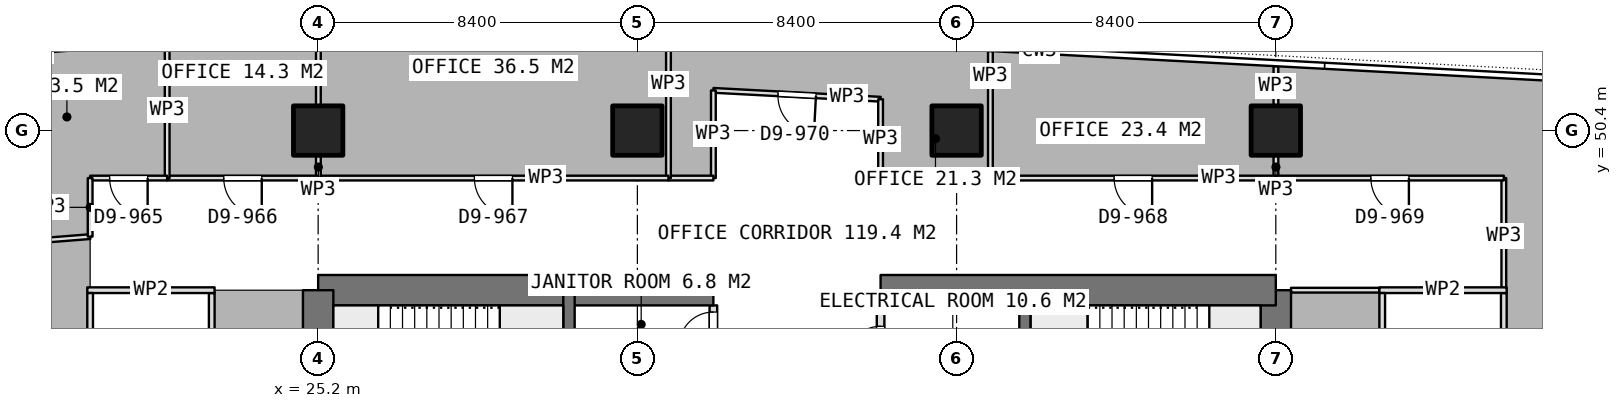
"""IFC4 building model, lengths in metres.
Left out: names, types, materials, properties, quantities, classifications, styles, units other than length and angle.
Written with IfcOpenShell. Run it as: python <this file> out.ifc"""

import sys

from ifc_helpers import new_model, si_unit, direction, frame, frame_2d, origin, origin_2d, place, context, subcontext, project, spatial, rectangle, extrude, element, fill, save


model = new_model("IFC4")
c1 = context("Model", 3, precision=1e-05, world=origin(), true_north=direction((0.0, 1.0)))
c2 = subcontext(c1, "Body", "Model", "MODEL_VIEW")
j1 = project(units=[si_unit("LENGTHUNIT", "METRE"), si_unit("PLANEANGLEUNIT", "RADIAN")], contexts=[c1])
p1 = place(None, origin())
s1 = spatial("IfcSite", under=j1, at=p1, CompositionType="ELEMENT")
p2 = place(p1, origin())
s2 = spatial("IfcBuilding", under=s1, at=p2, CompositionType="ELEMENT")
p3 = place(p2, frame((0.0, 0.0, 257.6)))
s3 = spatial("IfcBuildingStorey", under=s2, at=p3, CompositionType="ELEMENT", Elevation=257.6)
p4 = place(p3, frame((25.2, 46.2, 0.0), z_axis=(0.0, 0.0, 1.0), x_axis=(1.0, 0.0, 0.0)))
e1 = element("IfcWall", 1, at=p4, inside=s3, PredefinedType="SHEAR", context=c2, shape_type="SweptSolid", body=[
    extrude(rectangle(XDim=10.4, YDim=0.8, at=frame_2d((5.2, 0.0))), origin(), (0.0, 0.0, 1.0), 3.75),
])
p5 = place(p3, frame((40.0, 46.2, 0.0), z_axis=(0.0, 0.0, 1.0), x_axis=(1.0, 0.0, 0.0)))
e2 = element("IfcWall", 2, at=p5, inside=s3, PredefinedType="SHEAR", context=c2, shape_type="SweptSolid", body=[
    extrude(rectangle(XDim=10.4, YDim=0.8, at=frame_2d((5.2, 0.0))), origin(), (0.0, 0.0, 1.0), 3.75),
])
p6 = place(p3, frame((25.2, 21.0, 0.0), z_axis=(0.0, 0.0, 1.0), x_axis=(0.0, 1.0, 0.0)))
e3 = element("IfcWall", 3, at=p6, inside=s3, PredefinedType="SHEAR", context=c2, shape_type="SweptSolid", body=[
    extrude(rectangle(XDim=25.2, YDim=0.8, at=frame_2d((12.6, 0.0))), origin(), (0.0, 0.0, 1.0), 3.75),
])
p7 = place(p6, frame((7.8, 0.0, 0.0)))
e4 = element("IfcOpeningElement", 4, at=p7, cuts=e3, PredefinedType="OPENING", context=c2, shape_type="SweptSolid", body=[
    extrude(rectangle(XDim=1.2, YDim=2.1, at=frame_2d((0.6, 1.05))), frame((0.0, 0.41, 0.0), z_axis=(0.0, -1.0, 0.0), x_axis=(1.0, 0.0, 0.0)), (0.0, 0.0, 1.0), 0.82),
])
p8 = place(p6, frame((14.25, 0.0, 0.0)))
e5 = element("IfcOpeningElement", 5, at=p8, cuts=e3, PredefinedType="OPENING", context=c2, shape_type="SweptSolid", body=[
    extrude(rectangle(XDim=0.9, YDim=2.1, at=frame_2d((0.45, 1.05))), frame((0.0, 0.41, 0.0), z_axis=(0.0, -1.0, 0.0), x_axis=(1.0, 0.0, 0.0)), (0.0, 0.0, 1.0), 0.82),
])
p9 = place(p6, frame((16.85, 0.0, 0.0)))
e6 = element("IfcOpeningElement", 6, at=p9, cuts=e3, PredefinedType="OPENING", context=c2, shape_type="SweptSolid", body=[
    extrude(rectangle(XDim=0.9, YDim=2.1, at=frame_2d((0.45, 1.05))), frame((0.0, 0.41, 0.0), z_axis=(0.0, -1.0, 0.0), x_axis=(1.0, 0.0, 0.0)), (0.0, 0.0, 1.0), 0.82),
])
p10 = place(p6, frame((18.95, 0.0, 0.0)))
e7 = element("IfcOpeningElement", 7, at=p10, cuts=e3, PredefinedType="OPENING", context=c2, shape_type="SweptSolid", body=[
    extrude(rectangle(XDim=1.2, YDim=2.1, at=frame_2d((0.6, 1.05))), frame((0.0, 0.41, 0.0), z_axis=(0.0, -1.0, 0.0), x_axis=(1.0, 0.0, 0.0)), (0.0, 0.0, 1.0), 0.82),
])
p11 = place(p3, frame((50.4, 21.0, 0.0), z_axis=(0.0, 0.0, 1.0), x_axis=(0.0, 1.0, 0.0)))
e8 = element("IfcWall", 8, at=p11, inside=s3, PredefinedType="SHEAR", context=c2, shape_type="SweptSolid", body=[
    extrude(rectangle(XDim=25.2, YDim=0.8, at=frame_2d((12.6, 0.0))), origin(), (0.0, 0.0, 1.0), 3.75),
])
p12 = place(p11, frame((16.2, 0.0, 0.0)))
e9 = element("IfcOpeningElement", 9, at=p12, cuts=e8, PredefinedType="OPENING", context=c2, shape_type="SweptSolid", body=[
    extrude(rectangle(XDim=1.2, YDim=2.1, at=frame_2d((0.6, 1.05))), frame((0.0, 0.41, 0.0), z_axis=(0.0, -1.0, 0.0), x_axis=(1.0, 0.0, 0.0)), (0.0, 0.0, 1.0), 0.82),
])
p13 = place(p11, frame((10.05, 0.0, 0.0)))
e10 = element("IfcOpeningElement", 10, at=p13, cuts=e8, PredefinedType="OPENING", context=c2, shape_type="SweptSolid", body=[
    extrude(rectangle(XDim=0.9, YDim=2.1, at=frame_2d((0.45, 1.05))), frame((0.0, 0.41, 0.0), z_axis=(0.0, -1.0, 0.0), x_axis=(1.0, 0.0, 0.0)), (0.0, 0.0, 1.0), 0.82),
])
p14 = place(p11, frame((7.45, 0.0, 0.0)))
e11 = element("IfcOpeningElement", 11, at=p14, cuts=e8, PredefinedType="OPENING", context=c2, shape_type="SweptSolid", body=[
    extrude(rectangle(XDim=0.9, YDim=2.1, at=frame_2d((0.45, 1.05))), frame((0.0, 0.41, 0.0), z_axis=(0.0, -1.0, 0.0), x_axis=(1.0, 0.0, 0.0)), (0.0, 0.0, 1.0), 0.82),
])
p15 = place(p11, frame((0.6, 0.0, 0.0)))
e12 = element("IfcOpeningElement", 12, at=p15, cuts=e8, PredefinedType="OPENING", context=c2, shape_type="SweptSolid", body=[
    extrude(rectangle(XDim=1.2, YDim=2.1, at=frame_2d((0.6, 1.05))), frame((0.0, 0.41, 0.0), z_axis=(0.0, -1.0, 0.0), x_axis=(1.0, 0.0, 0.0)), (0.0, 0.0, 1.0), 0.82),
])
for number, where, z_axis, x_axis in (
    (13, (31.8, 21.0, 0.0), (0.0, 0.0, 1.0), (0.0, 1.0, 0.0)),
    (14, (43.8, 21.0, 0.0), (0.0, 0.0, 1.0), (0.0, 1.0, 0.0)),
):
    element("IfcWall", number, at=place(p3, frame(where, z_axis=z_axis, x_axis=x_axis)), inside=s3, PredefinedType="SHEAR", context=c2, shape_type="SweptSolid", body=[
        extrude(rectangle(XDim=25.2, YDim=0.3, at=frame_2d((12.6, 0.0))), origin(), (0.0, 0.0, 1.0), 3.75),
    ])
for number, where, z_axis, x_axis in (
    (15, (25.2, 50.4, 0.0), (0.0, 0.0, 1.0), (1.0, 0.0, 0.0)),
    (16, (33.6, 50.4, 0.0), (0.0, 0.0, 1.0), (1.0, 0.0, 0.0)),
    (17, (42.0, 50.4, 0.0), (0.0, 0.0, 1.0), (1.0, 0.0, 0.0)),
    (18, (50.4, 50.4, 0.0), (0.0, 0.0, 1.0), (1.0, 0.0, 0.0)),
):
    element("IfcColumn", number, at=place(p3, frame(where, z_axis=z_axis, x_axis=x_axis)), inside=s3, PredefinedType="COLUMN", context=c2, shape_type="SweptSolid", body=[
        extrude(rectangle(XDim=1.3, YDim=1.3, at=origin_2d()), origin(), (0.0, 0.0, 1.0), 3.75),
    ])
p16 = place(p3, frame((40.0, 41.55, 0.0), z_axis=(0.0, 0.0, 1.0), x_axis=(0.0, 1.0, 0.0)))
e19 = element("IfcWall", 19, at=p16, inside=s3, PredefinedType="PARTITIONING", context=c2, shape_type="SweptSolid", body=[
    extrude(rectangle(XDim=4.25, YDim=0.2, at=frame_2d((2.125, 0.0))), origin(), (0.0, 0.0, 1.0), 3.5),
])
p17 = place(p16, frame((2.8, 0.0, 0.0)))
e20 = element("IfcOpeningElement", 20, at=p17, cuts=e19, PredefinedType="OPENING", context=c2, shape_type="SweptSolid", body=[
    extrude(rectangle(XDim=0.9, YDim=2.1, at=frame_2d((0.45, 1.05))), frame((0.0, 0.11, 0.0), z_axis=(0.0, -1.0, 0.0), x_axis=(1.0, 0.0, 0.0)), (0.0, 0.0, 1.0), 0.22),
])
p18 = place(p16, frame((0.4, 0.0, 0.0)))
e21 = element("IfcOpeningElement", 21, at=p18, cuts=e19, PredefinedType="OPENING", context=c2, shape_type="SweptSolid", body=[
    extrude(rectangle(XDim=0.9, YDim=2.1, at=frame_2d((0.45, 1.05))), frame((0.0, 0.11, 0.0), z_axis=(0.0, -1.0, 0.0), x_axis=(1.0, 0.0, 0.0)), (0.0, 0.0, 1.0), 0.22),
])
p19 = place(p3, frame((35.6, 41.55, 0.0), z_axis=(0.0, 0.0, 1.0), x_axis=(0.0, 1.0, 0.0)))
e22 = element("IfcWall", 22, at=p19, inside=s3, PredefinedType="PARTITIONING", context=c2, shape_type="SweptSolid", body=[
    extrude(rectangle(XDim=4.25, YDim=0.2, at=frame_2d((2.125, 0.0))), origin(), (0.0, 0.0, 1.0), 3.5),
])
p20 = place(p19, frame((3.175, 0.0, 0.0)))
e23 = element("IfcOpeningElement", 23, at=p20, cuts=e22, PredefinedType="OPENING", context=c2, shape_type="SweptSolid", body=[
    extrude(rectangle(XDim=0.9, YDim=2.1, at=frame_2d((0.45, 1.05))), frame((0.0, 0.11, 0.0), z_axis=(0.0, -1.0, 0.0), x_axis=(1.0, 0.0, 0.0)), (0.0, 0.0, 1.0), 0.22),
])
p21 = place(p19, frame((0.8, 0.0, 0.0)))
e24 = element("IfcOpeningElement", 24, at=p21, cuts=e22, PredefinedType="OPENING", context=c2, shape_type="SweptSolid", body=[
    extrude(rectangle(XDim=1.1, YDim=2.1, at=frame_2d((0.55, 1.05))), frame((0.0, 0.11, 0.0), z_axis=(0.0, -1.0, 0.0), x_axis=(1.0, 0.0, 0.0)), (0.0, 0.0, 1.0), 0.22),
])
p22 = place(p3, frame((53.125, 46.2, 0.0), z_axis=(0.0, 0.0, 1.0), x_axis=(1.0, 0.0, 0.0)))
e25 = element("IfcWall", 25, at=p22, inside=s3, PredefinedType="PARTITIONING", context=c2, shape_type="SweptSolid", body=[
    extrude(rectangle(XDim=3.35, YDim=0.15, at=frame_2d((1.675, 0.0))), origin(), (0.0, 0.0, 1.0), 3.5),
])
p23 = place(p3, frame((53.2, 39.275, 0.0), z_axis=(0.0, 0.0, 1.0), x_axis=(0.0, 1.0, 0.0)))
e26 = element("IfcWall", 26, at=p23, inside=s3, PredefinedType="PARTITIONING", context=c2, shape_type="SweptSolid", body=[
    extrude(rectangle(XDim=6.85, YDim=0.15, at=frame_2d((3.425, 0.0))), origin(), (0.0, 0.0, 1.0), 3.5),
])
p24 = place(p23, frame((2.925, 0.0, 0.0)))
e27 = element("IfcOpeningElement", 27, at=p24, cuts=e26, PredefinedType="OPENING", context=c2, shape_type="SweptSolid", body=[
    extrude(rectangle(XDim=1.0, YDim=2.1, at=frame_2d((0.5, 1.05))), frame((0.0, 0.085, 0.0), z_axis=(0.0, -1.0, 0.0), x_axis=(1.0, 0.0, 0.0)), (0.0, 0.0, 1.0), 0.17),
])
p25 = place(p3, frame((56.4, 39.275, 0.0), z_axis=(0.0, 0.0, 1.0), x_axis=(0.0, 1.0, 0.0)))
e28 = element("IfcWall", 28, at=p25, inside=s3, PredefinedType="PARTITIONING", context=c2, shape_type="SweptSolid", body=[
    extrude(rectangle(XDim=6.85, YDim=0.15, at=frame_2d((3.425, 0.0))), origin(), (0.0, 0.0, 1.0), 3.5),
])
p26 = place(p3, frame((19.125, 46.2, 0.0), z_axis=(0.0, 0.0, 1.0), x_axis=(1.0, 0.0, 0.0)))
e29 = element("IfcWall", 29, at=p26, inside=s3, PredefinedType="PARTITIONING", context=c2, shape_type="SweptSolid", body=[
    extrude(rectangle(XDim=3.35, YDim=0.15, at=frame_2d((1.675, 0.0))), origin(), (0.0, 0.0, 1.0), 3.5),
])
p27 = place(p3, frame((19.2, 39.275, 0.0), z_axis=(0.0, 0.0, 1.0), x_axis=(0.0, 1.0, 0.0)))
e30 = element("IfcWall", 30, at=p27, inside=s3, PredefinedType="PARTITIONING", context=c2, shape_type="SweptSolid", body=[
    extrude(rectangle(XDim=6.85, YDim=0.15, at=frame_2d((3.425, 0.0))), origin(), (0.0, 0.0, 1.0), 3.5),
])
p28 = place(p3, frame((22.4, 39.275, 0.0), z_axis=(0.0, 0.0, 1.0), x_axis=(0.0, 1.0, 0.0)))
e31 = element("IfcWall", 31, at=p28, inside=s3, PredefinedType="PARTITIONING", context=c2, shape_type="SweptSolid", body=[
    extrude(rectangle(XDim=6.85, YDim=0.15, at=frame_2d((3.425, 0.0))), origin(), (0.0, 0.0, 1.0), 3.5),
])
p29 = place(p28, frame((2.925, 0.0, 0.0)))
e32 = element("IfcOpeningElement", 32, at=p29, cuts=e31, PredefinedType="OPENING", context=c2, shape_type="SweptSolid", body=[
    extrude(rectangle(XDim=1.0, YDim=2.1, at=frame_2d((0.5, 1.05))), frame((0.0, 0.085, 0.0), z_axis=(0.0, -1.0, 0.0), x_axis=(1.0, 0.0, 0.0)), (0.0, 0.0, 1.0), 0.17),
])
p30 = place(p3, frame((50.8, 46.2, 0.0), z_axis=(0.0, 0.0, 1.0), x_axis=(1.0, 0.0, 0.0)))
e33 = element("IfcWall", 33, at=p30, inside=s3, PredefinedType="PARTITIONING", context=c2, shape_type="SweptSolid", body=[
    extrude(rectangle(XDim=2.324, YDim=0.125, at=frame_2d((1.162, 0.0))), origin(), (0.0, 0.0, 1.0), 3.5),
])
p31 = place(p3, frame((50.403, 49.15, 0.0), z_axis=(0.0, 0.0, 1.0), x_axis=(0.0, 1.0, 0.0)))
e34 = element("IfcWall", 34, at=p31, inside=s3, PredefinedType="PARTITIONING", context=c2, shape_type="SweptSolid", body=[
    extrude(rectangle(XDim=0.58, YDim=0.125, at=frame_2d((0.29, 0.0))), origin(), (0.0, 0.0, 1.0), 3.5),
])
p32 = place(p3, frame((50.403, 51.07, 0.0), z_axis=(0.0, 0.0, 1.0), x_axis=(0.0, 1.0, 0.0)))
e35 = element("IfcWall", 35, at=p32, inside=s3, PredefinedType="PARTITIONING", context=c2, shape_type="SweptSolid", body=[
    extrude(rectangle(XDim=1.024, YDim=0.125, at=frame_2d((0.512, 0.0))), origin(), (0.0, 0.0, 1.0), 3.5),
])
p33 = place(p3, frame((56.4, 46.125, 0.0), z_axis=(0.0, 0.0, 1.0), x_axis=(0.0, 1.0, 0.0)))
e36 = element("IfcWall", 36, at=p33, inside=s3, PredefinedType="PARTITIONING", context=c2, shape_type="SweptSolid", body=[
    extrude(rectangle(XDim=3.025, YDim=0.125, at=frame_2d((1.512, 0.0))), origin(), (0.0, 0.0, 1.0), 3.5),
])
p34 = place(p3, frame((56.4, 49.15, 0.0), z_axis=(0.0, 0.0, 1.0), x_axis=(-1.0, 0.0, 0.0)))
e37 = element("IfcWall", 37, at=p34, inside=s3, PredefinedType="PARTITIONING", context=c2, shape_type="SweptSolid", body=[
    extrude(rectangle(XDim=5.997, YDim=0.125, at=frame_2d((2.999, 0.0))), origin(), (0.0, 0.0, 1.0), 3.5),
])
p35 = place(p34, frame((2.498, 0.0, 0.0)))
e38 = element("IfcOpeningElement", 38, at=p35, cuts=e37, PredefinedType="OPENING", context=c2, shape_type="SweptSolid", body=[
    extrude(rectangle(XDim=1.0, YDim=2.1, at=frame_2d((0.5, 1.05))), frame((0.0, 0.073, 0.0), z_axis=(0.0, -1.0, 0.0), x_axis=(1.0, 0.0, 0.0)), (0.0, 0.0, 1.0), 0.145),
])
p36 = place(p3, frame((50.402, 49.15, 0.0), z_axis=(0.0, 0.0, 1.0), x_axis=(-1.0, 0.0, 0.0)))
e39 = element("IfcWall", 39, at=p36, inside=s3, PredefinedType="PARTITIONING", context=c2, shape_type="SweptSolid", body=[
    extrude(rectangle(XDim=7.512, YDim=0.125, at=frame_2d((3.756, 0.0))), origin(), (0.0, 0.0, 1.0), 3.5),
])
p37 = place(p36, frame((3.256, 0.0, 0.0)))
e40 = element("IfcOpeningElement", 40, at=p37, cuts=e39, PredefinedType="OPENING", context=c2, shape_type="SweptSolid", body=[
    extrude(rectangle(XDim=1.0, YDim=2.1, at=frame_2d((0.5, 1.05))), frame((0.0, 0.073, 0.0), z_axis=(0.0, -1.0, 0.0), x_axis=(1.0, 0.0, 0.0)), (0.0, 0.0, 1.0), 0.145),
])
p38 = place(p3, frame((42.89, 49.15, 0.0), z_axis=(0.0, 0.0, 1.0), x_axis=(0.0, 1.0, 0.0)))
e41 = element("IfcWall", 41, at=p38, inside=s3, PredefinedType="PARTITIONING", context=c2, shape_type="SweptSolid", body=[
    extrude(rectangle(XDim=3.343, YDim=0.125, at=frame_2d((1.671, 0.0))), origin(), (0.0, 0.0, 1.0), 3.5),
])
p39 = place(p3, frame((40.0, 51.225, 0.0), z_axis=(0.0, 0.0, 1.0), x_axis=(-0.998601864588, 0.052861290579, 0.0)))
e42 = element("IfcWall", 42, at=p39, inside=s3, PredefinedType="PARTITIONING", context=c2, shape_type="SweptSolid", body=[
    extrude(rectangle(XDim=4.406, YDim=0.125, at=frame_2d((2.203, 0.0))), origin(), (0.0, 0.0, 1.0), 3.5),
])
p40 = place(p39, frame((1.703, 0.0, 0.0)))
e43 = element("IfcOpeningElement", 43, at=p40, cuts=e42, PredefinedType="OPENING", context=c2, shape_type="SweptSolid", body=[
    extrude(rectangle(XDim=1.0, YDim=2.1, at=frame_2d((0.5, 1.05))), frame((0.0, 0.073, 0.0), z_axis=(0.0, -1.0, 0.0), x_axis=(1.0, 0.0, 0.0)), (0.0, 0.0, 1.0), 0.145),
])
p41 = place(p3, frame((35.6, 51.458, 0.0), z_axis=(0.0, 0.0, 1.0), x_axis=(0.0, -1.0, 0.0)))
e44 = element("IfcWall", 44, at=p41, inside=s3, PredefinedType="PARTITIONING", context=c2, shape_type="SweptSolid", body=[
    extrude(rectangle(XDim=2.308, YDim=0.125, at=frame_2d((1.154, 0.0))), origin(), (0.0, 0.0, 1.0), 3.5),
])
p42 = place(p3, frame((35.6, 49.15, 0.0), z_axis=(0.0, 0.0, 1.0), x_axis=(-1.0, 0.0, 0.0)))
e45 = element("IfcWall", 45, at=p42, inside=s3, PredefinedType="PARTITIONING", context=c2, shape_type="SweptSolid", body=[
    extrude(rectangle(XDim=1.182, YDim=0.125, at=frame_2d((0.591, 0.0))), origin(), (0.0, 0.0, 1.0), 3.5),
])
p43 = place(p3, frame((34.418, 49.15, 0.0), z_axis=(0.0, 0.0, 1.0), x_axis=(0.0, 1.0, 0.0)))
e46 = element("IfcWall", 46, at=p43, inside=s3, PredefinedType="PARTITIONING", context=c2, shape_type="SweptSolid", body=[
    extrude(rectangle(XDim=3.793, YDim=0.125, at=frame_2d((1.896, 0.0))), origin(), (0.0, 0.0, 1.0), 3.5),
])
p44 = place(p3, frame((42.889, 49.15, 0.0), z_axis=(0.0, 0.0, 1.0), x_axis=(-1.0, 0.0, 0.0)))
e47 = element("IfcWall", 47, at=p44, inside=s3, PredefinedType="PARTITIONING", context=c2, shape_type="SweptSolid", body=[
    extrude(rectangle(XDim=2.889, YDim=0.125, at=frame_2d((1.444, 0.0))), origin(), (0.0, 0.0, 1.0), 3.5),
])
p45 = place(p3, frame((40.0, 49.15, 0.0), z_axis=(0.0, 0.0, 1.0), x_axis=(0.0, 1.0, 0.0)))
e48 = element("IfcWall", 48, at=p45, inside=s3, PredefinedType="PARTITIONING", context=c2, shape_type="SweptSolid", body=[
    extrude(rectangle(XDim=2.075, YDim=0.125, at=frame_2d((1.038, 0.0))), origin(), (0.0, 0.0, 1.0), 3.5),
])
p46 = place(p3, frame((34.417, 49.15, 0.0), z_axis=(0.0, 0.0, 1.0), x_axis=(-1.0, 0.0, 0.0)))
e49 = element("IfcWall", 49, at=p46, inside=s3, PredefinedType="PARTITIONING", context=c2, shape_type="SweptSolid", body=[
    extrude(rectangle(XDim=9.211, YDim=0.125, at=frame_2d((4.605, 0.0))), origin(), (0.0, 0.0, 1.0), 3.5),
])
p47 = place(p46, frame((4.105, 0.0, 0.0)))
e50 = element("IfcOpeningElement", 50, at=p47, cuts=e49, PredefinedType="OPENING", context=c2, shape_type="SweptSolid", body=[
    extrude(rectangle(XDim=1.0, YDim=2.1, at=frame_2d((0.5, 1.05))), frame((0.0, 0.073, 0.0), z_axis=(0.0, -1.0, 0.0), x_axis=(1.0, 0.0, 0.0)), (0.0, 0.0, 1.0), 0.145),
])
p48 = place(p3, frame((25.206, 49.15, 0.0), z_axis=(0.0, 0.0, 1.0), x_axis=(0.0, 1.0, 0.0)))
e51 = element("IfcWall", 51, at=p48, inside=s3, PredefinedType="PARTITIONING", context=c2, shape_type="SweptSolid", body=[
    extrude(rectangle(XDim=0.58, YDim=0.125, at=frame_2d((0.29, 0.0))), origin(), (0.0, 0.0, 1.0), 3.5),
])
p49 = place(p3, frame((25.206, 51.07, 0.0), z_axis=(0.0, 0.0, 1.0), x_axis=(0.0, 1.0, 0.0)))
e52 = element("IfcWall", 52, at=p49, inside=s3, PredefinedType="PARTITIONING", context=c2, shape_type="SweptSolid", body=[
    extrude(rectangle(XDim=1.955, YDim=0.125, at=frame_2d((0.978, 0.0))), origin(), (0.0, 0.0, 1.0), 3.5),
])
p50 = place(p3, frame((25.205, 49.15, 0.0), z_axis=(0.0, 0.0, 1.0), x_axis=(-1.0, 0.0, 0.0)))
e53 = element("IfcWall", 53, at=p50, inside=s3, PredefinedType="PARTITIONING", context=c2, shape_type="SweptSolid", body=[
    extrude(rectangle(XDim=3.978, YDim=0.125, at=frame_2d((1.989, 0.0))), origin(), (0.0, 0.0, 1.0), 3.5),
])
p51 = place(p50, frame((1.489, 0.0, 0.0)))
e54 = element("IfcOpeningElement", 54, at=p51, cuts=e53, PredefinedType="OPENING", context=c2, shape_type="SweptSolid", body=[
    extrude(rectangle(XDim=1.0, YDim=2.1, at=frame_2d((0.5, 1.05))), frame((0.0, 0.073, 0.0), z_axis=(0.0, -1.0, 0.0), x_axis=(1.0, 0.0, 0.0)), (0.0, 0.0, 1.0), 0.145),
])
p52 = place(p3, frame((21.227, 49.15, 0.0), z_axis=(0.0, 0.0, 1.0), x_axis=(0.0, 1.0, 0.0)))
e55 = element("IfcWall", 55, at=p52, inside=s3, PredefinedType="PARTITIONING", context=c2, shape_type="SweptSolid", body=[
    extrude(rectangle(XDim=3.558, YDim=0.125, at=frame_2d((1.779, 0.0))), origin(), (0.0, 0.0, 1.0), 3.5),
])
p53 = place(p3, frame((19.2, 47.61, 0.0), z_axis=(0.0, 0.0, 1.0), x_axis=(-0.99683691537, -0.079474298708, 0.0)))
e56 = element("IfcWall", 56, at=p53, inside=s3, PredefinedType="PARTITIONING", context=c2, shape_type="SweptSolid", body=[
    extrude(rectangle(XDim=3.259, YDim=0.125, at=frame_2d((1.63, 0.0))), origin(), (0.0, 0.0, 1.0), 3.5),
])
p54 = place(p3, frame((21.226, 49.15, 0.0), z_axis=(0.0, 0.0, 1.0), x_axis=(-1.0, 0.0, 0.0)))
e57 = element("IfcWall", 57, at=p54, inside=s3, PredefinedType="PARTITIONING", context=c2, shape_type="SweptSolid", body=[
    extrude(rectangle(XDim=2.026, YDim=0.125, at=frame_2d((1.013, 0.0))), origin(), (0.0, 0.0, 1.0), 3.5),
])
p55 = place(p54, frame((0.513, 0.0, 0.0)))
e58 = element("IfcOpeningElement", 58, at=p55, cuts=e57, PredefinedType="OPENING", context=c2, shape_type="SweptSolid", body=[
    extrude(rectangle(XDim=1.0, YDim=2.1, at=frame_2d((0.5, 1.05))), frame((0.0, 0.073, 0.0), z_axis=(0.0, -1.0, 0.0), x_axis=(1.0, 0.0, 0.0)), (0.0, 0.0, 1.0), 0.145),
])
p56 = place(p3, frame((19.2, 49.15, 0.0), z_axis=(0.0, 0.0, 1.0), x_axis=(0.0, -1.0, 0.0)))
e59 = element("IfcWall", 59, at=p56, inside=s3, PredefinedType="PARTITIONING", context=c2, shape_type="SweptSolid", body=[
    extrude(rectangle(XDim=1.54, YDim=0.125, at=frame_2d((0.77, 0.0))), origin(), (0.0, 0.0, 1.0), 3.5),
])
p57 = place(p17, origin())
e60 = element("IfcDoor", 60, at=p57, inside=s3, OperationType="SINGLE_SWING_LEFT", PredefinedType="DOOR", context=c2, shape_type="SweptSolid", body=[
    extrude(rectangle(XDim=0.9, YDim=2.1, at=frame_2d((0.45, 1.05))), frame((0.0, 0.025, 0.0), z_axis=(0.0, -1.0, 0.0), x_axis=(1.0, 0.0, 0.0)), (0.0, 0.0, 1.0), 0.05),
])
fill(e20, e60)
p58 = place(p20, origin())
e61 = element("IfcDoor", 61, at=p58, inside=s3, OperationType="SINGLE_SWING_LEFT", PredefinedType="DOOR", context=c2, shape_type="SweptSolid", body=[
    extrude(rectangle(XDim=0.9, YDim=2.1, at=frame_2d((0.45, 1.05))), frame((0.0, 0.025, 0.0), z_axis=(0.0, -1.0, 0.0), x_axis=(1.0, 0.0, 0.0)), (0.0, 0.0, 1.0), 0.05),
])
fill(e23, e61)
p59 = place(p35, origin())
e62 = element("IfcDoor", 62, at=p59, inside=s3, OperationType="SINGLE_SWING_LEFT", PredefinedType="DOOR", context=c2, shape_type="SweptSolid", body=[
    extrude(rectangle(XDim=1.0, YDim=2.1, at=frame_2d((0.5, 1.05))), frame((0.0, 0.025, 0.0), z_axis=(0.0, -1.0, 0.0), x_axis=(1.0, 0.0, 0.0)), (0.0, 0.0, 1.0), 0.05),
])
fill(e38, e62)
p60 = place(p37, origin())
e63 = element("IfcDoor", 63, at=p60, inside=s3, OperationType="SINGLE_SWING_LEFT", PredefinedType="DOOR", context=c2, shape_type="SweptSolid", body=[
    extrude(rectangle(XDim=1.0, YDim=2.1, at=frame_2d((0.5, 1.05))), frame((0.0, 0.025, 0.0), z_axis=(0.0, -1.0, 0.0), x_axis=(1.0, 0.0, 0.0)), (0.0, 0.0, 1.0), 0.05),
])
fill(e40, e63)
p61 = place(p40, origin())
e64 = element("IfcDoor", 64, at=p61, inside=s3, OperationType="SINGLE_SWING_LEFT", PredefinedType="DOOR", context=c2, shape_type="SweptSolid", body=[
    extrude(rectangle(XDim=1.0, YDim=2.1, at=frame_2d((0.5, 1.05))), frame((0.0, 0.025, 0.0), z_axis=(0.0, -1.0, 0.0), x_axis=(1.0, 0.0, 0.0)), (0.0, 0.0, 1.0), 0.05),
])
fill(e43, e64)
p62 = place(p47, origin())
e65 = element("IfcDoor", 65, at=p62, inside=s3, OperationType="SINGLE_SWING_LEFT", PredefinedType="DOOR", context=c2, shape_type="SweptSolid", body=[
    extrude(rectangle(XDim=1.0, YDim=2.1, at=frame_2d((0.5, 1.05))), frame((0.0, 0.025, 0.0), z_axis=(0.0, -1.0, 0.0), x_axis=(1.0, 0.0, 0.0)), (0.0, 0.0, 1.0), 0.05),
])
fill(e50, e65)
p63 = place(p51, origin())
e66 = element("IfcDoor", 66, at=p63, inside=s3, OperationType="SINGLE_SWING_LEFT", PredefinedType="DOOR", context=c2, shape_type="SweptSolid", body=[
    extrude(rectangle(XDim=1.0, YDim=2.1, at=frame_2d((0.5, 1.05))), frame((0.0, 0.025, 0.0), z_axis=(0.0, -1.0, 0.0), x_axis=(1.0, 0.0, 0.0)), (0.0, 0.0, 1.0), 0.05),
])
fill(e54, e66)
p64 = place(p55, origin())
e67 = element("IfcDoor", 67, at=p64, inside=s3, OperationType="SINGLE_SWING_LEFT", PredefinedType="DOOR", context=c2, shape_type="SweptSolid", body=[
    extrude(rectangle(XDim=1.0, YDim=2.1, at=frame_2d((0.5, 1.05))), frame((0.0, 0.025, 0.0), z_axis=(0.0, -1.0, 0.0), x_axis=(1.0, 0.0, 0.0)), (0.0, 0.0, 1.0), 0.05),
])
fill(e58, e67)
save(model, sys.argv[1])
